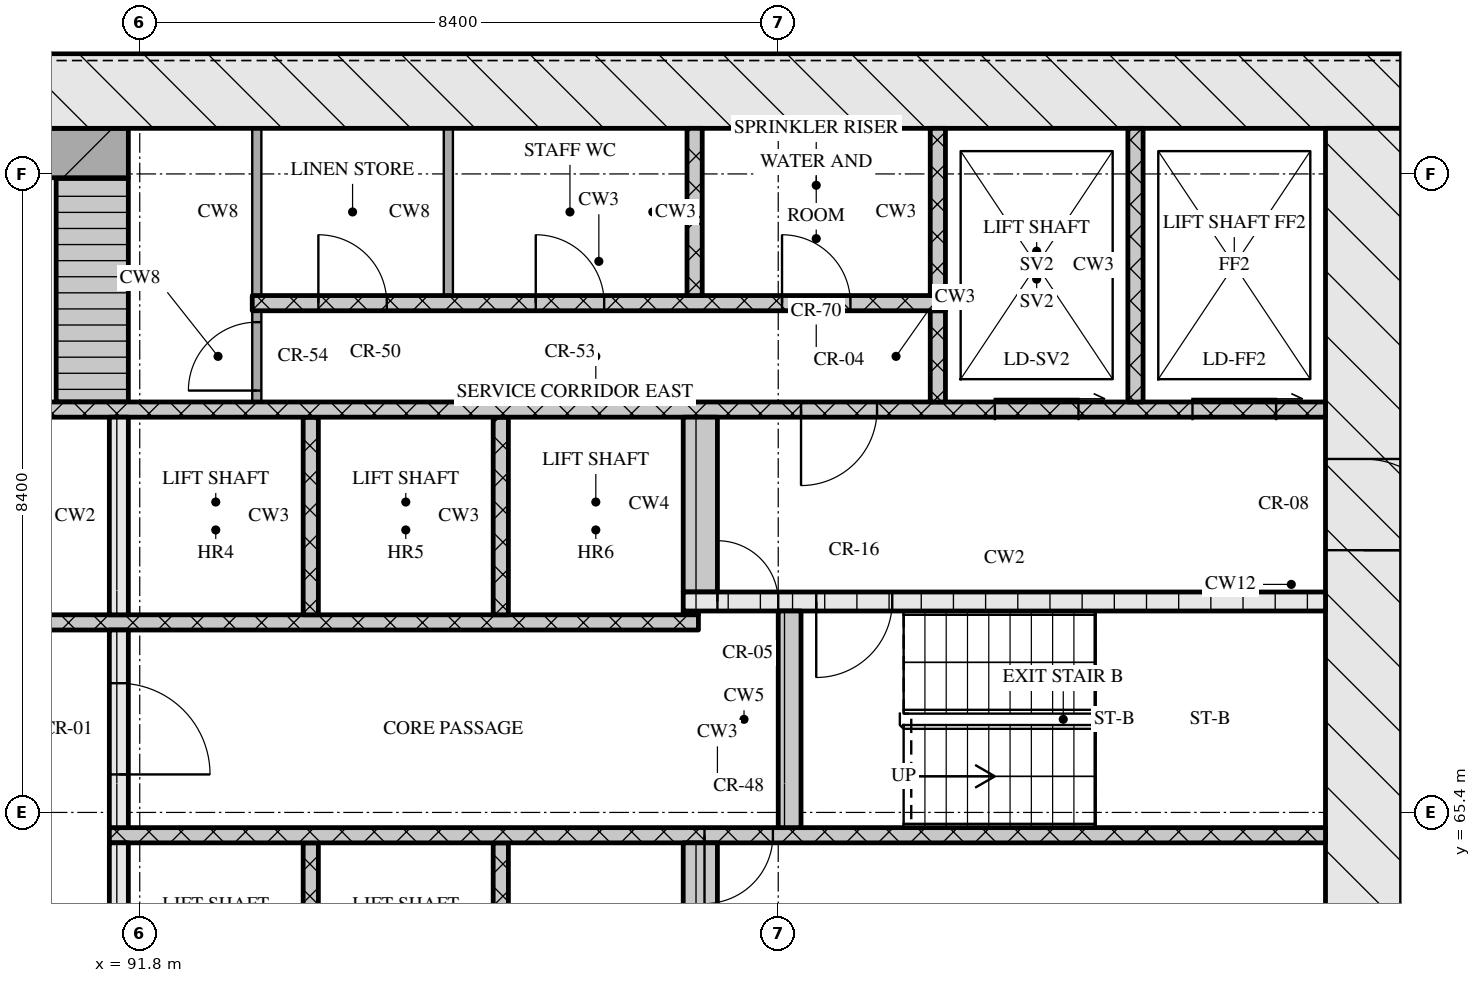
"""IFC4 building model, lengths in metres.
Left out: names, types, materials, properties, quantities, classifications, styles, units other than length and angle.
Written with IfcOpenShell. Run it as: python <this file> out.ifc"""

import sys

from ifc_helpers import new_model, si_unit, direction, frame, frame_2d, origin, place, context, subcontext, project, spatial, rectangle, extrude, element, fill, save


model = new_model("IFC4")
c1 = context("Model", 3, precision=1e-05, world=origin(), true_north=direction((0.0, 1.0)))
c2 = subcontext(c1, "Body", "Model", "MODEL_VIEW")
j1 = project(units=[si_unit("LENGTHUNIT", "METRE"), si_unit("PLANEANGLEUNIT", "RADIAN")], contexts=[c1])
p1 = place(None, origin())
s1 = spatial("IfcSite", under=j1, at=p1, CompositionType="ELEMENT")
p2 = place(p1, origin())
s2 = spatial("IfcBuilding", under=s1, at=p2, CompositionType="ELEMENT")
p3 = place(p2, frame((0.0, 0.0, 98.85)))
s3 = spatial("IfcBuildingStorey", under=s2, at=p3, CompositionType="ELEMENT", Elevation=98.85)
p4 = place(p3, frame((66.8, 74.9, 0.0), z_axis=(0.0, 0.0, 1.0), x_axis=(1.0, 0.0, 0.0)))
e1 = element("IfcWall", 1, at=p4, inside=s3, PredefinedType="SOLIDWALL", context=c2, shape_type="SweptSolid", body=[
    extrude(rectangle(XDim=41.6, YDim=1.0, at=frame_2d((20.8, 0.0))), origin(), (0.0, 0.0, 1.0), 3.32),
])
p5 = place(p3, frame((107.9, 62.4, 0.0), z_axis=(0.0, 0.0, 1.0), x_axis=(0.0, 1.0, 0.0)))
e2 = element("IfcWall", 2, at=p5, inside=s3, PredefinedType="SOLIDWALL", context=c2, shape_type="SweptSolid", body=[
    extrude(rectangle(XDim=12.0, YDim=1.0, at=frame_2d((6.0, 0.0))), origin(), (0.0, 0.0, 1.0), 3.32),
])
p6 = place(p5, frame((6.45, 0.0, 0.0)))
e3 = element("IfcOpeningElement", 3, at=p6, cuts=e2, PredefinedType="OPENING", context=c2, shape_type="SweptSolid", body=[
    extrude(rectangle(XDim=1.2, YDim=2.1, at=frame_2d((0.6, 1.05))), frame((0.0, 0.51, 0.0), z_axis=(0.0, -1.0, 0.0), x_axis=(1.0, 0.0, 0.0)), (0.0, 0.0, 1.0), 1.02),
])
p7 = place(p3, frame((91.525, 62.4, 0.0), z_axis=(0.0, 0.0, 1.0), x_axis=(0.0, 1.0, 0.0)))
e4 = element("IfcWall", 4, at=p7, inside=s3, PredefinedType="SOLIDWALL", context=c2, shape_type="SweptSolid", body=[
    extrude(rectangle(XDim=2.6, YDim=0.25, at=frame_2d((1.3, 0.0))), origin(), (0.0, 0.0, 1.0), 3.32),
])
for number, where, z_axis, x_axis in (
    (5, (94.05, 62.4, 0.0), (0.0, 0.0, 1.0), (0.0, 1.0, 0.0)),
    (6, (96.55, 62.4, 0.0), (0.0, 0.0, 1.0), (0.0, 1.0, 0.0)),
):
    element("IfcWall", number, at=place(p3, frame(where, z_axis=z_axis, x_axis=x_axis)), inside=s3, PredefinedType="SOLIDWALL", context=c2, shape_type="SweptSolid", body=[
        extrude(rectangle(XDim=2.6, YDim=0.2, at=frame_2d((1.3, 0.0))), origin(), (0.0, 0.0, 1.0), 3.32),
    ])
p8 = place(p3, frame((99.175, 62.4, 0.0), z_axis=(0.0, 0.0, 1.0), x_axis=(0.0, 1.0, 0.0)))
e7 = element("IfcWall", 7, at=p8, inside=s3, PredefinedType="SOLIDWALL", context=c2, shape_type="SweptSolid", body=[
    extrude(rectangle(XDim=2.6, YDim=0.45, at=frame_2d((1.3, 0.0))), origin(), (0.0, 0.0, 1.0), 3.32),
])
p9 = place(p3, frame((91.4, 65.1, 0.0), z_axis=(0.0, 0.0, 1.0), x_axis=(1.0, 0.0, 0.0)))
e8 = element("IfcWall", 8, at=p9, inside=s3, PredefinedType="SOLIDWALL", context=c2, shape_type="SweptSolid", body=[
    extrude(rectangle(XDim=16.0, YDim=0.2, at=frame_2d((8.0, 0.0))), origin(), (0.0, 0.0, 1.0), 3.32),
])
p10 = place(p9, frame((7.83, 0.0, 0.0)))
e9 = element("IfcOpeningElement", 9, at=p10, cuts=e8, PredefinedType="OPENING", context=c2, shape_type="SweptSolid", body=[
    extrude(rectangle(XDim=0.9, YDim=2.1, at=frame_2d((0.45, 1.05))), frame((0.0, 0.11, 0.0), z_axis=(0.0, -1.0, 0.0), x_axis=(1.0, 0.0, 0.0)), (0.0, 0.0, 1.0), 0.22),
])
p11 = place(p3, frame((91.525, 65.2, 0.0), z_axis=(0.0, 0.0, 1.0), x_axis=(0.0, 1.0, 0.0)))
e10 = element("IfcWall", 10, at=p11, inside=s3, PredefinedType="SOLIDWALL", context=c2, shape_type="SweptSolid", body=[
    extrude(rectangle(XDim=2.6, YDim=0.25, at=frame_2d((1.3, 0.0))), origin(), (0.0, 0.0, 1.0), 3.32),
])
p12 = place(p11, frame((0.7, 0.0, 0.0)))
e11 = element("IfcOpeningElement", 11, at=p12, cuts=e10, PredefinedType="OPENING", context=c2, shape_type="SweptSolid", body=[
    extrude(rectangle(XDim=1.2, YDim=2.1, at=frame_2d((0.6, 1.05))), frame((0.0, 0.135, 0.0), z_axis=(0.0, -1.0, 0.0), x_axis=(1.0, 0.0, 0.0)), (0.0, 0.0, 1.0), 0.27),
])
p13 = place(p3, frame((100.35, 65.2, 0.0), z_axis=(0.0, 0.0, 1.0), x_axis=(0.0, 1.0, 0.0)))
e12 = element("IfcWall", 12, at=p13, inside=s3, PredefinedType="SOLIDWALL", context=c2, shape_type="SweptSolid", body=[
    extrude(rectangle(XDim=2.85, YDim=0.3, at=frame_2d((1.425, 0.0))), origin(), (0.0, 0.0, 1.0), 3.32),
])
p14 = place(p3, frame((76.05, 67.9, 0.0), z_axis=(0.0, 0.0, 1.0), x_axis=(1.0, 0.0, 0.0)))
e13 = element("IfcWall", 13, at=p14, inside=s3, PredefinedType="SOLIDWALL", context=c2, shape_type="SweptSolid", body=[
    extrude(rectangle(XDim=23.1, YDim=0.2, at=frame_2d((11.55, 0.0))), origin(), (0.0, 0.0, 1.0), 3.32),
])
p15 = place(p14, frame((0.6, 0.0, 0.0)))
e14 = element("IfcOpeningElement", 14, at=p15, cuts=e13, PredefinedType="OPENING", context=c2, shape_type="SweptSolid", body=[
    extrude(rectangle(XDim=1.1, YDim=2.1, at=frame_2d((0.55, 1.05))), frame((0.0, 0.11, 0.0), z_axis=(0.0, -1.0, 0.0), x_axis=(1.0, 0.0, 0.0)), (0.0, 0.0, 1.0), 0.22),
])
p16 = place(p14, frame((3.1, 0.0, 0.0)))
e15 = element("IfcOpeningElement", 15, at=p16, cuts=e13, PredefinedType="OPENING", context=c2, shape_type="SweptSolid", body=[
    extrude(rectangle(XDim=1.1, YDim=2.1, at=frame_2d((0.55, 1.05))), frame((0.0, 0.11, 0.0), z_axis=(0.0, -1.0, 0.0), x_axis=(1.0, 0.0, 0.0)), (0.0, 0.0, 1.0), 0.22),
])
p17 = place(p14, frame((5.6, 0.0, 0.0)))
e16 = element("IfcOpeningElement", 16, at=p17, cuts=e13, PredefinedType="OPENING", context=c2, shape_type="SweptSolid", body=[
    extrude(rectangle(XDim=1.1, YDim=2.1, at=frame_2d((0.55, 1.05))), frame((0.0, 0.11, 0.0), z_axis=(0.0, -1.0, 0.0), x_axis=(1.0, 0.0, 0.0)), (0.0, 0.0, 1.0), 0.22),
])
p18 = place(p14, frame((8.45, 0.0, 0.0)))
e17 = element("IfcOpeningElement", 17, at=p18, cuts=e13, PredefinedType="OPENING", context=c2, shape_type="SweptSolid", body=[
    extrude(rectangle(XDim=0.9, YDim=2.1, at=frame_2d((0.45, 1.05))), frame((0.0, 0.11, 0.0), z_axis=(0.0, -1.0, 0.0), x_axis=(1.0, 0.0, 0.0)), (0.0, 0.0, 1.0), 0.22),
])
p19 = place(p14, frame((10.91, 0.0, 0.0)))
e18 = element("IfcOpeningElement", 18, at=p19, cuts=e13, PredefinedType="OPENING", context=c2, shape_type="SweptSolid", body=[
    extrude(rectangle(XDim=0.9, YDim=2.1, at=frame_2d((0.45, 1.05))), frame((0.0, 0.11, 0.0), z_axis=(0.0, -1.0, 0.0), x_axis=(1.0, 0.0, 0.0)), (0.0, 0.0, 1.0), 0.22),
])
p20 = place(p14, frame((13.55, 0.0, 0.0)))
e19 = element("IfcOpeningElement", 19, at=p20, cuts=e13, PredefinedType="OPENING", context=c2, shape_type="SweptSolid", body=[
    extrude(rectangle(XDim=1.0, YDim=2.1, at=frame_2d((0.5, 1.05))), frame((0.0, 0.11, 0.0), z_axis=(0.0, -1.0, 0.0), x_axis=(1.0, 0.0, 0.0)), (0.0, 0.0, 1.0), 0.22),
])
p21 = place(p3, frame((91.525, 68.0, 0.0), z_axis=(0.0, 0.0, 1.0), x_axis=(0.0, 1.0, 0.0)))
e20 = element("IfcWall", 20, at=p21, inside=s3, PredefinedType="SOLIDWALL", context=c2, shape_type="SweptSolid", body=[
    extrude(rectangle(XDim=2.6, YDim=0.25, at=frame_2d((1.3, 0.0))), origin(), (0.0, 0.0, 1.0), 3.32),
])
for number, where, z_axis, x_axis in (
    (21, (94.05, 68.0, 0.0), (0.0, 0.0, 1.0), (0.0, 1.0, 0.0)),
    (22, (96.55, 68.0, 0.0), (0.0, 0.0, 1.0), (0.0, 1.0, 0.0)),
):
    element("IfcWall", number, at=place(p3, frame(where, z_axis=z_axis, x_axis=x_axis)), inside=s3, PredefinedType="SOLIDWALL", context=c2, shape_type="SweptSolid", body=[
        extrude(rectangle(XDim=2.6, YDim=0.2, at=frame_2d((1.3, 0.0))), origin(), (0.0, 0.0, 1.0), 3.32),
    ])
p22 = place(p3, frame((98.95, 68.025, 0.0), z_axis=(0.0, 0.0, 1.0), x_axis=(1.0, 0.0, 0.0)))
e23 = element("IfcWall", 23, at=p22, inside=s3, PredefinedType="SOLIDWALL", context=c2, shape_type="SweptSolid", body=[
    extrude(rectangle(XDim=0.2, YDim=0.05, at=frame_2d((0.1, 0.0))), origin(), (0.0, 0.0, 1.0), 3.32),
])
p23 = place(p3, frame((98.95, 68.175, 0.0), z_axis=(0.0, 0.0, 1.0), x_axis=(1.0, 0.0, 0.0)))
e24 = element("IfcWall", 24, at=p23, inside=s3, PredefinedType="SOLIDWALL", context=c2, shape_type="SweptSolid", body=[
    extrude(rectangle(XDim=8.45, YDim=0.25, at=frame_2d((4.225, 0.0))), origin(), (0.0, 0.0, 1.0), 3.32),
])
p24 = place(p23, frame((0.45, 0.0, 0.0)))
e25 = element("IfcOpeningElement", 25, at=p24, cuts=e24, PredefinedType="OPENING", context=c2, shape_type="SweptSolid", body=[
    extrude(rectangle(XDim=0.8, YDim=2.1, at=frame_2d((0.4, 1.05))), frame((0.0, 0.135, 0.0), z_axis=(0.0, -1.0, 0.0), x_axis=(1.0, 0.0, 0.0)), (0.0, 0.0, 1.0), 0.27),
])
p25 = place(p23, frame((1.75, 0.0, 0.0)))
e26 = element("IfcOpeningElement", 26, at=p25, cuts=e24, PredefinedType="OPENING", context=c2, shape_type="SweptSolid", body=[
    extrude(rectangle(XDim=1.0, YDim=2.1, at=frame_2d((0.5, 1.05))), frame((0.0, 0.135, 0.0), z_axis=(0.0, -1.0, 0.0), x_axis=(1.0, 0.0, 0.0)), (0.0, 0.0, 1.0), 0.27),
])
p26 = place(p3, frame((99.175, 68.3, 0.0), z_axis=(0.0, 0.0, 1.0), x_axis=(0.0, 1.0, 0.0)))
e27 = element("IfcWall", 27, at=p26, inside=s3, PredefinedType="SOLIDWALL", context=c2, shape_type="SweptSolid", body=[
    extrude(rectangle(XDim=2.3, YDim=0.45, at=frame_2d((1.15, 0.0))), origin(), (0.0, 0.0, 1.0), 3.32),
])
p27 = place(p3, frame((67.8, 70.7, 0.0), z_axis=(0.0, 0.0, 1.0), x_axis=(1.0, 0.0, 0.0)))
e28 = element("IfcWall", 28, at=p27, inside=s3, PredefinedType="SOLIDWALL", context=c2, shape_type="SweptSolid", body=[
    extrude(rectangle(XDim=39.6, YDim=0.2, at=frame_2d((19.8, 0.0))), origin(), (0.0, 0.0, 1.0), 3.32),
])
p28 = place(p27, frame((0.65, 0.0, 0.0)))
e29 = element("IfcOpeningElement", 29, at=p28, cuts=e28, PredefinedType="OPENING", context=c2, shape_type="SweptSolid", body=[
    extrude(rectangle(XDim=1.1, YDim=2.1, at=frame_2d((0.55, 1.05))), frame((0.0, 0.11, 0.0), z_axis=(0.0, -1.0, 0.0), x_axis=(1.0, 0.0, 0.0)), (0.0, 0.0, 1.0), 0.22),
])
p29 = place(p27, frame((3.25, 0.0, 0.0)))
e30 = element("IfcOpeningElement", 30, at=p29, cuts=e28, PredefinedType="OPENING", context=c2, shape_type="SweptSolid", body=[
    extrude(rectangle(XDim=1.1, YDim=2.1, at=frame_2d((0.55, 1.05))), frame((0.0, 0.11, 0.0), z_axis=(0.0, -1.0, 0.0), x_axis=(1.0, 0.0, 0.0)), (0.0, 0.0, 1.0), 0.22),
])
p30 = place(p27, frame((5.9, 0.0, 0.0)))
e31 = element("IfcOpeningElement", 31, at=p30, cuts=e28, PredefinedType="OPENING", context=c2, shape_type="SweptSolid", body=[
    extrude(rectangle(XDim=1.0, YDim=2.1, at=frame_2d((0.5, 1.05))), frame((0.0, 0.11, 0.0), z_axis=(0.0, -1.0, 0.0), x_axis=(1.0, 0.0, 0.0)), (0.0, 0.0, 1.0), 0.22),
])
p31 = place(p27, frame((21.7, 0.0, 0.0)))
e32 = element("IfcOpeningElement", 32, at=p31, cuts=e28, PredefinedType="OPENING", context=c2, shape_type="SweptSolid", body=[
    extrude(rectangle(XDim=1.0, YDim=2.1, at=frame_2d((0.5, 1.05))), frame((0.0, 0.11, 0.0), z_axis=(0.0, -1.0, 0.0), x_axis=(1.0, 0.0, 0.0)), (0.0, 0.0, 1.0), 0.22),
])
p32 = place(p27, frame((32.7, 0.0, 0.0)))
e33 = element("IfcOpeningElement", 33, at=p32, cuts=e28, PredefinedType="OPENING", context=c2, shape_type="SweptSolid", body=[
    extrude(rectangle(XDim=1.0, YDim=2.1, at=frame_2d((0.5, 1.05))), frame((0.0, 0.11, 0.0), z_axis=(0.0, -1.0, 0.0), x_axis=(1.0, 0.0, 0.0)), (0.0, 0.0, 1.0), 0.22),
])
p33 = place(p27, frame((35.25, 0.0, 0.0)))
e34 = element("IfcOpeningElement", 34, at=p33, cuts=e28, PredefinedType="OPENING", context=c2, shape_type="SweptSolid", body=[
    extrude(rectangle(XDim=1.1, YDim=2.1, at=frame_2d((0.55, 1.05))), frame((0.0, 0.11, 0.0), z_axis=(0.0, -1.0, 0.0), x_axis=(1.0, 0.0, 0.0)), (0.0, 0.0, 1.0), 0.22),
])
p34 = place(p27, frame((37.85, 0.0, 0.0)))
e35 = element("IfcOpeningElement", 35, at=p34, cuts=e28, PredefinedType="OPENING", context=c2, shape_type="SweptSolid", body=[
    extrude(rectangle(XDim=1.1, YDim=2.1, at=frame_2d((0.55, 1.05))), frame((0.0, 0.11, 0.0), z_axis=(0.0, -1.0, 0.0), x_axis=(1.0, 0.0, 0.0)), (0.0, 0.0, 1.0), 0.22),
])
p35 = place(p3, frame((91.175, 70.8, 0.0), z_axis=(0.0, 0.0, 1.0), x_axis=(0.0, 1.0, 0.0)))
e36 = element("IfcWall", 36, at=p35, inside=s3, PredefinedType="SOLIDWALL", context=c2, shape_type="SweptSolid", body=[
    extrude(rectangle(XDim=2.95, YDim=0.95, at=frame_2d((1.475, 0.0))), origin(), (0.0, 0.0, 1.0), 3.32),
])
p36 = place(p3, frame((93.34, 70.8, 0.0), z_axis=(0.0, 0.0, 1.0), x_axis=(0.0, 1.0, 0.0)))
e37 = element("IfcWall", 37, at=p36, inside=s3, PredefinedType="PARTITIONING", context=c2, shape_type="SweptSolid", body=[
    extrude(rectangle(XDim=1.2, YDim=0.12, at=frame_2d((0.6, 0.0))), origin(), (0.0, 0.0, 1.0), 3.32),
])
p37 = place(p36, frame((0.15, 0.0, 0.0)))
e38 = element("IfcOpeningElement", 38, at=p37, cuts=e37, PredefinedType="OPENING", context=c2, shape_type="SweptSolid", body=[
    extrude(rectangle(XDim=0.9, YDim=2.1, at=frame_2d((0.45, 1.05))), frame((0.0, 0.07, 0.0), z_axis=(0.0, -1.0, 0.0), x_axis=(1.0, 0.0, 0.0)), (0.0, 0.0, 1.0), 0.14),
])
p38 = place(p3, frame((102.3, 70.8, 0.0), z_axis=(0.0, 0.0, 1.0), x_axis=(0.0, 1.0, 0.0)))
e39 = element("IfcWall", 39, at=p38, inside=s3, PredefinedType="SOLIDWALL", context=c2, shape_type="SweptSolid", body=[
    extrude(rectangle(XDim=1.2, YDim=0.2, at=frame_2d((0.6, 0.0))), origin(), (0.0, 0.0, 1.0), 3.32),
])
p39 = place(p3, frame((104.9, 70.8, 0.0), z_axis=(0.0, 0.0, 1.0), x_axis=(0.0, 1.0, 0.0)))
e40 = element("IfcWall", 40, at=p39, inside=s3, PredefinedType="SOLIDWALL", context=c2, shape_type="SweptSolid", body=[
    extrude(rectangle(XDim=3.6, YDim=0.2, at=frame_2d((1.8, 0.0))), origin(), (0.0, 0.0, 1.0), 3.32),
])
p40 = place(p3, frame((93.28, 72.1, 0.0), z_axis=(0.0, 0.0, 1.0), x_axis=(1.0, 0.0, 0.0)))
e41 = element("IfcWall", 41, at=p40, inside=s3, PredefinedType="SOLIDWALL", context=c2, shape_type="SweptSolid", body=[
    extrude(rectangle(XDim=9.12, YDim=0.2, at=frame_2d((4.56, 0.0))), origin(), (0.0, 0.0, 1.0), 3.32),
])
p41 = place(p40, frame((0.87, 0.0, 0.0)))
e42 = element("IfcOpeningElement", 42, at=p41, cuts=e41, PredefinedType="OPENING", context=c2, shape_type="SweptSolid", body=[
    extrude(rectangle(XDim=0.9, YDim=2.1, at=frame_2d((0.45, 1.05))), frame((0.0, 0.11, 0.0), z_axis=(0.0, -1.0, 0.0), x_axis=(1.0, 0.0, 0.0)), (0.0, 0.0, 1.0), 0.22),
])
p42 = place(p40, frame((3.73, 0.0, 0.0)))
e43 = element("IfcOpeningElement", 43, at=p42, cuts=e41, PredefinedType="OPENING", context=c2, shape_type="SweptSolid", body=[
    extrude(rectangle(XDim=0.9, YDim=2.1, at=frame_2d((0.45, 1.05))), frame((0.0, 0.11, 0.0), z_axis=(0.0, -1.0, 0.0), x_axis=(1.0, 0.0, 0.0)), (0.0, 0.0, 1.0), 0.22),
])
p43 = place(p40, frame((6.97, 0.0, 0.0)))
e44 = element("IfcOpeningElement", 44, at=p43, cuts=e41, PredefinedType="OPENING", context=c2, shape_type="SweptSolid", body=[
    extrude(rectangle(XDim=0.9, YDim=2.1, at=frame_2d((0.45, 1.05))), frame((0.0, 0.11, 0.0), z_axis=(0.0, -1.0, 0.0), x_axis=(1.0, 0.0, 0.0)), (0.0, 0.0, 1.0), 0.22),
])
for number, where, z_axis, x_axis in (
    (45, (93.34, 72.2, 0.0), (0.0, 0.0, 1.0), (0.0, 1.0, 0.0)),
    (46, (95.86, 72.2, 0.0), (0.0, 0.0, 1.0), (0.0, 1.0, 0.0)),
):
    element("IfcWall", number, at=place(p3, frame(where, z_axis=z_axis, x_axis=x_axis)), inside=s3, PredefinedType="PARTITIONING", context=c2, shape_type="SweptSolid", body=[
        extrude(rectangle(XDim=2.2, YDim=0.12, at=frame_2d((1.1, 0.0))), origin(), (0.0, 0.0, 1.0), 3.32),
    ])
for number, where, z_axis, x_axis in (
    (47, (99.1, 72.2, 0.0), (0.0, 0.0, 1.0), (0.0, 1.0, 0.0)),
    (48, (102.3, 72.2, 0.0), (0.0, 0.0, 1.0), (0.0, 1.0, 0.0)),
):
    element("IfcWall", number, at=place(p3, frame(where, z_axis=z_axis, x_axis=x_axis)), inside=s3, PredefinedType="SOLIDWALL", context=c2, shape_type="SweptSolid", body=[
        extrude(rectangle(XDim=2.2, YDim=0.2, at=frame_2d((1.1, 0.0))), origin(), (0.0, 0.0, 1.0), 3.32),
    ])
p44 = place(p3, frame((83.55, 74.075, 0.0), z_axis=(0.0, 0.0, 1.0), x_axis=(1.0, 0.0, 0.0)))
e49 = element("IfcWall", 49, at=p44, inside=s3, PredefinedType="SOLIDWALL", context=c2, shape_type="SweptSolid", body=[
    extrude(rectangle(XDim=8.1, YDim=0.65, at=frame_2d((4.05, 0.0))), origin(), (0.0, 0.0, 1.0), 3.32),
])
p45 = place(p10, origin())
e50 = element("IfcDoor", 50, at=p45, inside=s3, OperationType="SINGLE_SWING_RIGHT", PredefinedType="DOOR", context=c2, shape_type="SweptSolid", body=[
    extrude(rectangle(XDim=0.9, YDim=2.1, at=frame_2d((0.45, 1.05))), frame((0.0, 0.025, 0.0), z_axis=(0.0, -1.0, 0.0), x_axis=(1.0, 0.0, 0.0)), (0.0, 0.0, 1.0), 0.05),
])
fill(e9, e50)
p46 = place(p12, origin())
e51 = element("IfcDoor", 51, at=p46, inside=s3, OperationType="SINGLE_SWING_RIGHT", PredefinedType="DOOR", context=c2, shape_type="SweptSolid", body=[
    extrude(rectangle(XDim=1.2, YDim=2.1, at=frame_2d((0.6, 1.05))), frame((0.0, 0.025, 0.0), z_axis=(0.0, -1.0, 0.0), x_axis=(1.0, 0.0, 0.0)), (0.0, 0.0, 1.0), 0.05),
])
fill(e11, e51)
p47 = place(p24, origin())
e52 = element("IfcDoor", 52, at=p47, inside=s3, OperationType="SINGLE_SWING_LEFT", PredefinedType="DOOR", context=c2, shape_type="SweptSolid", body=[
    extrude(rectangle(XDim=0.8, YDim=2.1, at=frame_2d((0.4, 1.05))), frame((0.0, 0.025, 0.0), z_axis=(0.0, -1.0, 0.0), x_axis=(1.0, 0.0, 0.0)), (0.0, 0.0, 1.0), 0.05),
])
fill(e25, e52)
p48 = place(p25, origin())
e53 = element("IfcDoor", 53, at=p48, inside=s3, OperationType="SINGLE_SWING_RIGHT", PredefinedType="DOOR", context=c2, shape_type="SweptSolid", body=[
    extrude(rectangle(XDim=1.0, YDim=2.1, at=frame_2d((0.5, 1.05))), frame((0.0, 0.025, 0.0), z_axis=(0.0, -1.0, 0.0), x_axis=(1.0, 0.0, 0.0)), (0.0, 0.0, 1.0), 0.05),
])
fill(e26, e53)
p49 = place(p6, origin())
e54 = element("IfcDoor", 54, at=p49, inside=s3, OperationType="SINGLE_SWING_RIGHT", PredefinedType="DOOR", context=c2, shape_type="SweptSolid", body=[
    extrude(rectangle(XDim=1.2, YDim=2.1, at=frame_2d((0.6, 1.05))), frame((0.0, 0.025, 0.0), z_axis=(0.0, -1.0, 0.0), x_axis=(1.0, 0.0, 0.0)), (0.0, 0.0, 1.0), 0.05),
])
fill(e3, e54)
p50 = place(p32, origin())
e55 = element("IfcDoor", 55, at=p50, inside=s3, OperationType="SINGLE_SWING_RIGHT", PredefinedType="DOOR", context=c2, shape_type="SweptSolid", body=[
    extrude(rectangle(XDim=1.0, YDim=2.1, at=frame_2d((0.5, 1.05))), frame((0.0, 0.025, 0.0), z_axis=(0.0, -1.0, 0.0), x_axis=(1.0, 0.0, 0.0)), (0.0, 0.0, 1.0), 0.05),
])
fill(e33, e55)
p51 = place(p33, origin())
e56 = element("IfcDoor", 56, at=p51, inside=s3, OperationType="SLIDING_TO_RIGHT", PredefinedType="DOOR", context=c2, shape_type="SweptSolid", body=[
    extrude(rectangle(XDim=1.1, YDim=2.1, at=frame_2d((0.55, 1.05))), frame((0.0, 0.025, 0.0), z_axis=(0.0, -1.0, 0.0), x_axis=(1.0, 0.0, 0.0)), (0.0, 0.0, 1.0), 0.05),
])
fill(e34, e56)
p52 = place(p34, origin())
e57 = element("IfcDoor", 57, at=p52, inside=s3, OperationType="SLIDING_TO_RIGHT", PredefinedType="DOOR", context=c2, shape_type="SweptSolid", body=[
    extrude(rectangle(XDim=1.1, YDim=2.1, at=frame_2d((0.55, 1.05))), frame((0.0, 0.025, 0.0), z_axis=(0.0, -1.0, 0.0), x_axis=(1.0, 0.0, 0.0)), (0.0, 0.0, 1.0), 0.05),
])
fill(e35, e57)
p53 = place(p37, origin())
e58 = element("IfcDoor", 58, at=p53, inside=s3, OperationType="SINGLE_SWING_LEFT", PredefinedType="DOOR", context=c2, shape_type="SweptSolid", body=[
    extrude(rectangle(XDim=0.9, YDim=2.1, at=frame_2d((0.45, 1.05))), frame((0.0, 0.025, 0.0), z_axis=(0.0, -1.0, 0.0), x_axis=(1.0, 0.0, 0.0)), (0.0, 0.0, 1.0), 0.05),
])
fill(e38, e58)
p54 = place(p41, origin())
e59 = element("IfcDoor", 59, at=p54, inside=s3, OperationType="SINGLE_SWING_LEFT", PredefinedType="DOOR", context=c2, shape_type="SweptSolid", body=[
    extrude(rectangle(XDim=0.9, YDim=2.1, at=frame_2d((0.45, 1.05))), frame((0.0, 0.025, 0.0), z_axis=(0.0, -1.0, 0.0), x_axis=(1.0, 0.0, 0.0)), (0.0, 0.0, 1.0), 0.05),
])
fill(e42, e59)
p55 = place(p42, origin())
e60 = element("IfcDoor", 60, at=p55, inside=s3, OperationType="SINGLE_SWING_LEFT", PredefinedType="DOOR", context=c2, shape_type="SweptSolid", body=[
    extrude(rectangle(XDim=0.9, YDim=2.1, at=frame_2d((0.45, 1.05))), frame((0.0, 0.025, 0.0), z_axis=(0.0, -1.0, 0.0), x_axis=(1.0, 0.0, 0.0)), (0.0, 0.0, 1.0), 0.05),
])
fill(e43, e60)
p56 = place(p43, origin())
e61 = element("IfcDoor", 61, at=p56, inside=s3, OperationType="SINGLE_SWING_LEFT", PredefinedType="DOOR", context=c2, shape_type="SweptSolid", body=[
    extrude(rectangle(XDim=0.9, YDim=2.1, at=frame_2d((0.45, 1.05))), frame((0.0, 0.025, 0.0), z_axis=(0.0, -1.0, 0.0), x_axis=(1.0, 0.0, 0.0)), (0.0, 0.0, 1.0), 0.05),
])
fill(e44, e61)
save(model, sys.argv[1])
